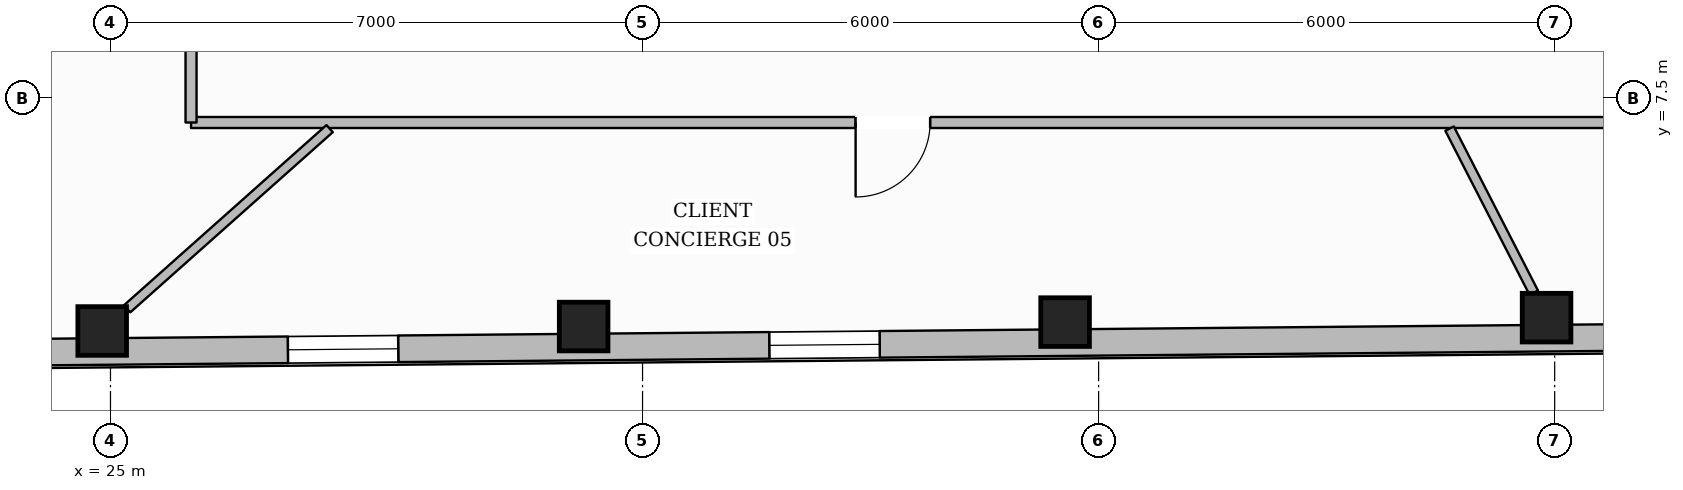
"""IFC4 building model, lengths in metres.
Left out: names, types, materials, properties, quantities, classifications, styles, units other than length and angle.
Written with IfcOpenShell. Run it as: python <this file> out.ifc"""

import sys

from ifc_helpers import new_model, si_unit, direction, frame, frame_2d, origin, origin_2d, place, context, subcontext, project, spatial, rectangle, hollow_rectangle, extrude, element, fill, save


model = new_model("IFC4")
c1 = context("Model", 3, precision=1e-05, world=origin(), true_north=direction((0.0, 1.0)))
c2 = subcontext(c1, "Body", "Model", "MODEL_VIEW")
j1 = project(units=[si_unit("LENGTHUNIT", "METRE"), si_unit("PLANEANGLEUNIT", "RADIAN")], contexts=[c1])
p1 = place(None, origin())
s1 = spatial("IfcSite", under=j1, at=p1, CompositionType="ELEMENT")
p2 = place(p1, origin())
s2 = spatial("IfcBuilding", under=s1, at=p2, CompositionType="ELEMENT")
p3 = place(p2, frame((0.0, 0.0, 222.75)))
s3 = spatial("IfcBuildingStorey", under=s2, at=p3, CompositionType="ELEMENT", Elevation=222.75)
for number, where, z_axis, x_axis in (
    (1, (24.891, 4.437, 0.0), (0.0, 0.0, 1.0), (1.0, 0.0, 0.0)),
    (2, (31.225, 4.496, 0.0), (0.0, 0.0, 1.0), (1.0, 0.0, 0.0)),
    (3, (37.559, 4.554, 0.0), (0.0, 0.0, 1.0), (1.0, 0.0, 0.0)),
    (4, (43.893, 4.613, 0.0), (0.0, 0.0, 1.0), (1.0, 0.0, 0.0)),
):
    element("IfcColumn", number, at=place(p3, frame(where, z_axis=z_axis, x_axis=x_axis)), inside=s3, PredefinedType="COLUMN", context=c2, shape_type="SweptSolid", body=[
        extrude(hollow_rectangle(XDim=0.64, YDim=0.64, WallThickness=0.028, at=origin_2d()), origin(), (0.0, 0.0, 1.0), 3.6),
    ])
p4 = place(p3, frame((57.038, 4.464, 0.0), z_axis=(0.0, 0.0, 1.0), x_axis=(-0.999957405044, -0.009229739812, 0.0)))
e5 = element("IfcWall", 5, at=p4, inside=s3, PredefinedType="STANDARD", context=c2, shape_type="SweptSolid", body=[
    extrude(rectangle(XDim=38.963, YDim=0.35, at=frame_2d((19.481, 0.0))), origin(), (0.0, 0.0, 1.0), 3.132),
])
p5 = place(p4, frame((34.588, 0.0, 0.65)))
e6 = element("IfcOpeningElement", 6, at=p5, cuts=e5, PredefinedType="OPENING", context=c2, shape_type="SweptSolid", body=[
    extrude(rectangle(XDim=1.45, YDim=1.75, at=frame_2d((0.725, 0.875))), frame((0.0, 0.185, 0.0), z_axis=(0.0, -1.0, 0.0), x_axis=(1.0, 0.0, 0.0)), (0.0, 0.0, 1.0), 0.37),
])
p6 = place(p4, frame((28.254, 0.0, 0.65)))
e7 = element("IfcOpeningElement", 7, at=p6, cuts=e5, PredefinedType="OPENING", context=c2, shape_type="SweptSolid", body=[
    extrude(rectangle(XDim=1.45, YDim=1.75, at=frame_2d((0.725, 0.875))), frame((0.0, 0.185, 0.0), z_axis=(0.0, -1.0, 0.0), x_axis=(1.0, 0.0, 0.0)), (0.0, 0.0, 1.0), 0.37),
])
p7 = place(p4, frame((21.919, 0.0, 0.65)))
e8 = element("IfcOpeningElement", 8, at=p7, cuts=e5, PredefinedType="OPENING", context=c2, shape_type="SweptSolid", body=[
    extrude(rectangle(XDim=1.45, YDim=1.75, at=frame_2d((0.725, 0.875))), frame((0.0, 0.185, 0.0), z_axis=(0.0, -1.0, 0.0), x_axis=(1.0, 0.0, 0.0)), (0.0, 0.0, 1.0), 0.37),
])
p8 = place(p4, frame((9.25, 0.0, 0.65)))
e9 = element("IfcOpeningElement", 9, at=p8, cuts=e5, PredefinedType="OPENING", context=c2, shape_type="SweptSolid", body=[
    extrude(rectangle(XDim=1.45, YDim=1.75, at=frame_2d((0.725, 0.875))), frame((0.0, 0.185, 0.0), z_axis=(0.0, -1.0, 0.0), x_axis=(1.0, 0.0, 0.0)), (0.0, 0.0, 1.0), 0.37),
])
p9 = place(p4, frame((2.916, 0.0, 0.65)))
e10 = element("IfcOpeningElement", 10, at=p9, cuts=e5, PredefinedType="OPENING", context=c2, shape_type="SweptSolid", body=[
    extrude(rectangle(XDim=1.45, YDim=1.75, at=frame_2d((0.725, 0.875))), frame((0.0, 0.185, 0.0), z_axis=(0.0, -1.0, 0.0), x_axis=(1.0, 0.0, 0.0)), (0.0, 0.0, 1.0), 0.37),
])
p10 = place(p3, frame((49.94, 7.18, 0.0), z_axis=(0.0, 0.0, 1.0), x_axis=(-1.0, 0.0, 0.0)))
e11 = element("IfcWall", 11, at=p10, inside=s3, PredefinedType="PARTITIONING", context=c2, shape_type="SweptSolid", body=[
    extrude(rectangle(XDim=23.88, YDim=0.145, at=frame_2d((11.94, 0.0))), origin(), (0.0, 0.0, 1.0), 3.339),
])
p11 = place(p10, frame((14.157, 0.0, 0.0)))
e12 = element("IfcOpeningElement", 12, at=p11, cuts=e11, PredefinedType="OPENING", context=c2, shape_type="SweptSolid", body=[
    extrude(rectangle(XDim=0.98, YDim=2.15, at=frame_2d((0.49, 1.075))), frame((0.0, 0.083, 0.0), z_axis=(0.0, -1.0, 0.0), x_axis=(1.0, 0.0, 0.0)), (0.0, 0.0, 1.0), 0.165),
])
p12 = place(p10, frame((3.056, 0.0, 0.0)))
e13 = element("IfcOpeningElement", 13, at=p12, cuts=e11, PredefinedType="OPENING", context=c2, shape_type="SweptSolid", body=[
    extrude(rectangle(XDim=0.98, YDim=2.15, at=frame_2d((0.49, 1.075))), frame((0.0, 0.083, 0.0), z_axis=(0.0, -1.0, 0.0), x_axis=(1.0, 0.0, 0.0)), (0.0, 0.0, 1.0), 0.165),
])
p13 = place(p3, frame((26.06, 7.18, 0.0), z_axis=(0.0, 0.0, 1.0), x_axis=(0.0, 1.0, 0.0)))
e14 = element("IfcWall", 14, at=p13, inside=s3, PredefinedType="PARTITIONING", context=c2, shape_type="SweptSolid", body=[
    extrude(rectangle(XDim=4.97, YDim=0.145, at=frame_2d((2.485, 0.0))), origin(), (0.0, 0.0, 1.0), 3.6),
])
p14 = place(p13, frame((1.995, 0.0, 0.0)))
e15 = element("IfcOpeningElement", 15, at=p14, cuts=e14, PredefinedType="OPENING", context=c2, shape_type="SweptSolid", body=[
    extrude(rectangle(XDim=0.98, YDim=2.15, at=frame_2d((0.49, 1.075))), frame((0.0, 0.083, 0.0), z_axis=(0.0, -1.0, 0.0), x_axis=(1.0, 0.0, 0.0)), (0.0, 0.0, 1.0), 0.165),
])
p15 = place(p3, frame((27.883, 7.1, 0.0), z_axis=(0.0, 0.0, 1.0), x_axis=(-0.747084406965, -0.664729184608, 0.0)))
e16 = element("IfcWall", 16, at=p15, inside=s3, PredefinedType="PARTITIONING", context=c2, shape_type="SweptSolid", body=[
    extrude(rectangle(XDim=3.566, YDim=0.125, at=frame_2d((1.783, 0.0))), origin(), (0.0, 0.0, 1.0), 3.6),
])
p16 = place(p3, frame((42.617, 7.1, 0.0), z_axis=(0.0, 0.0, 1.0), x_axis=(0.456486180098, -0.889730502669, 0.0)))
e17 = element("IfcWall", 17, at=p16, inside=s3, PredefinedType="PARTITIONING", context=c2, shape_type="SweptSolid", body=[
    extrude(rectangle(XDim=2.427, YDim=0.125, at=frame_2d((1.213, 0.0))), origin(), (0.0, 0.0, 1.0), 3.6),
])
p17 = place(p6, origin())
e18 = element("IfcWindow", 18, at=p17, inside=s3, PartitioningType="SINGLE_PANEL", PredefinedType="WINDOW", context=c2, shape_type="SweptSolid", body=[
    extrude(rectangle(XDim=1.45, YDim=1.75, at=frame_2d((0.725, 0.875))), frame((0.0, 0.03, 0.0), z_axis=(0.0, -1.0, 0.0), x_axis=(1.0, 0.0, 0.0)), (0.0, 0.0, 1.0), 0.06),
])
fill(e7, e18)
p18 = place(p7, origin())
e19 = element("IfcWindow", 19, at=p18, inside=s3, PartitioningType="SINGLE_PANEL", PredefinedType="WINDOW", context=c2, shape_type="SweptSolid", body=[
    extrude(rectangle(XDim=1.45, YDim=1.75, at=frame_2d((0.725, 0.875))), frame((0.0, 0.03, 0.0), z_axis=(0.0, -1.0, 0.0), x_axis=(1.0, 0.0, 0.0)), (0.0, 0.0, 1.0), 0.06),
])
fill(e8, e19)
p19 = place(p11, origin())
e20 = element("IfcDoor", 20, at=p19, inside=s3, OperationType="SINGLE_SWING_RIGHT", PredefinedType="DOOR", context=c2, shape_type="SweptSolid", body=[
    extrude(rectangle(XDim=0.98, YDim=2.15, at=frame_2d((0.49, 1.075))), frame((0.0, 0.025, 0.0), z_axis=(0.0, -1.0, 0.0), x_axis=(1.0, 0.0, 0.0)), (0.0, 0.0, 1.0), 0.05),
])
fill(e12, e20)
save(model, sys.argv[1])
